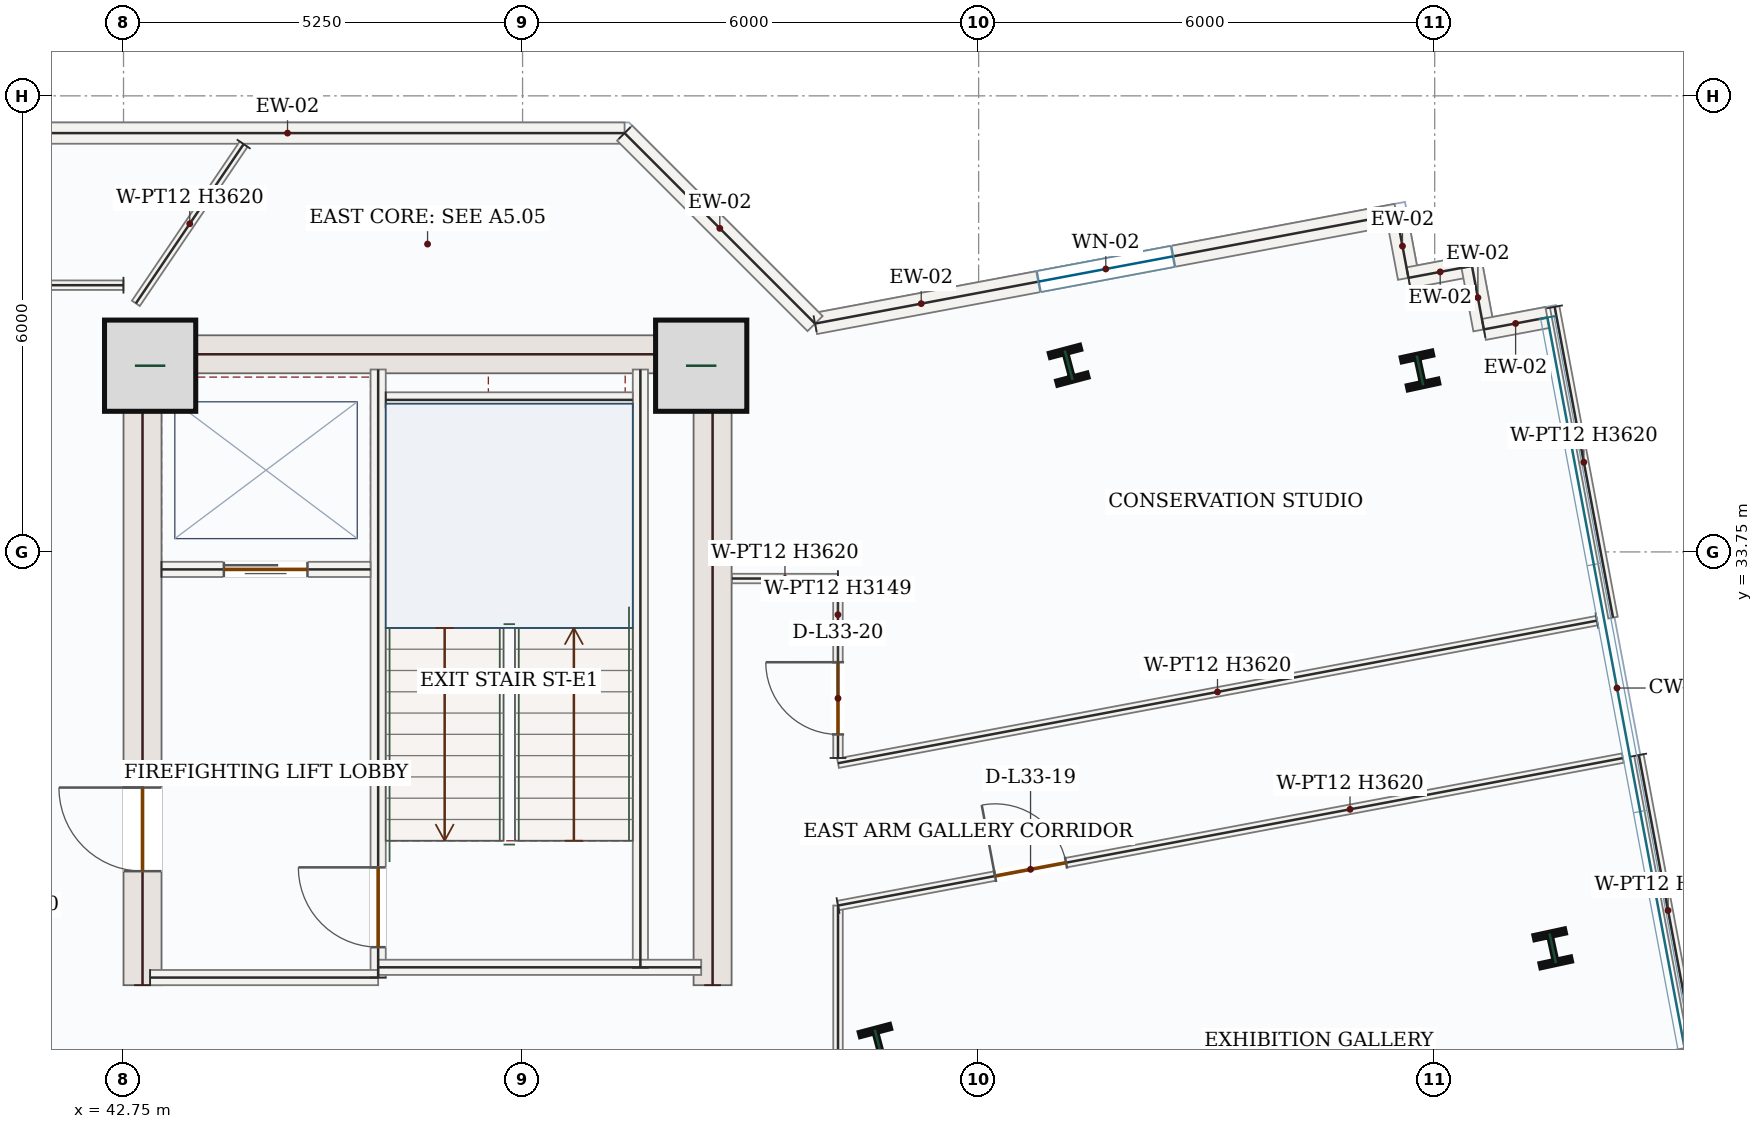
"""IFC4 building model, lengths in metres.
Left out: names, types, materials, properties, quantities, classifications, styles, units other than length and angle.
Written with IfcOpenShell. Run it as: python <this file> out.ifc"""

import sys

from ifc_helpers import new_model, si_unit, direction, frame, frame_2d, origin, origin_2d, place, context, subcontext, project, spatial, rectangle, i_section, extrude, source, transform, mapped, element, fill, save


model = new_model("IFC4")
c1 = context("Model", 3, precision=1e-05, world=origin(), true_north=direction((0.0, 1.0)))
c2 = subcontext(c1, "Body", "Model", "MODEL_VIEW")
j1 = project(units=[si_unit("LENGTHUNIT", "METRE"), si_unit("PLANEANGLEUNIT", "RADIAN")], contexts=[c1])
p1 = place(None, origin())
s1 = spatial("IfcSite", under=j1, at=p1, CompositionType="ELEMENT")
p2 = place(p1, origin())
s2 = spatial("IfcBuilding", under=s1, at=p2, CompositionType="ELEMENT")
p3 = place(p2, frame((0.0, 0.0, 147.3)))
s3 = spatial("IfcBuildingStorey", under=s2, at=p3, CompositionType="ELEMENT", Elevation=147.3)
p4 = place(p3, frame((43.0, 28.05, 0.0), z_axis=(0.0, 0.0, 1.0), x_axis=(0.0, 1.0, 0.0)))
e1 = element("IfcWall", 1, at=p4, inside=s3, PredefinedType="SHEAR", context=c2, shape_type="SweptSolid", body=[
    extrude(rectangle(XDim=8.55, YDim=0.5, at=frame_2d((4.275, 0.0))), origin(), (0.0, 0.0, 1.0), 3.62),
])
p5 = place(p4, frame((1.5, 0.0, 0.0)))
e2 = element("IfcOpeningElement", 2, at=p5, cuts=e1, PredefinedType="OPENING", context=c2, shape_type="SweptSolid", body=[
    extrude(rectangle(XDim=1.1, YDim=2.2, at=frame_2d((0.55, 1.1))), frame((0.0, 0.26, 0.0), z_axis=(0.0, -1.0, 0.0), x_axis=(1.0, 0.0, 0.0)), (0.0, 0.0, 1.0), 0.52),
])
m1 = source(origin(), c2, "Body", "SweptSolid", [
    extrude(rectangle(XDim=8.55, YDim=0.5, at=frame_2d((4.275, 0.0))), origin(), (0.0, 0.0, 1.0), 3.62),
])
p6 = place(p3, frame((50.5, 28.05, 0.0), z_axis=(0.0, 0.0, 1.0), x_axis=(0.0, 1.0, 0.0)))
e3 = element("IfcWall", 3, at=p6, inside=s3, PredefinedType="SHEAR", context=c2, shape_type="MappedRepresentation", body=[
    mapped(m1, transform((0.0, 0.0, 0.0), x_axis=(1.0, 0.0, 0.0), y_axis=(0.0, 1.0, 0.0), z_axis=(0.0, 0.0, 1.0), scale=1.0)),
])
m2 = source(origin(), c2, "Body", "SweptSolid", [
    extrude(rectangle(XDim=7.0, YDim=0.5, at=frame_2d((3.5, 0.0))), origin(), (0.0, 0.0, 1.0), 3.62),
])
p7 = place(p3, frame((43.25, 36.35, 0.0), z_axis=(0.0, 0.0, 1.0), x_axis=(1.0, 0.0, 0.0)))
e4 = element("IfcWall", 4, at=p7, inside=s3, PredefinedType="SHEAR", context=c2, shape_type="MappedRepresentation", body=[
    mapped(m2, transform((0.0, 0.0, 0.0), x_axis=(1.0, 0.0, 0.0), y_axis=(0.0, 1.0, 0.0), z_axis=(0.0, 0.0, 1.0), scale=1.0)),
])
m3 = source(origin(), c2, "Body", "SweptSolid", [
    extrude(rectangle(XDim=1.2, YDim=1.2, at=origin_2d()), origin(), (0.0, 0.0, 1.0), 3.9),
])
for number, where, z_axis, x_axis in (
    (5, (43.1, 36.2, 0.0), (0.0, 0.0, 1.0), (1.0, 0.0, 0.0)),
    (6, (50.35, 36.2, 0.0), (0.0, 0.0, 1.0), (1.0, 0.0, 0.0)),
):
    element("IfcColumn", number, at=place(p3, frame(where, z_axis=z_axis, x_axis=x_axis)), inside=s3, PredefinedType="COLUMN", context=c2, shape_type="MappedRepresentation", body=[
        mapped(m3, transform((0.0, 0.0, 0.0), x_axis=(1.0, 0.0, 0.0), y_axis=(0.0, 1.0, 0.0), z_axis=(0.0, 0.0, 1.0), scale=1.0)),
    ])
m4 = source(origin(), c2, "Body", "SweptSolid", [
    extrude(i_section(OverallWidth=0.412, OverallDepth=0.435, WebThickness=0.036, FlangeThickness=0.057, FilletRadius=0.018, at=origin_2d()), origin(), (0.0, 0.0, 1.0), 3.9),
])
for number, where, z_axis, x_axis in (
    (7, (52.684, 27.271, 0.0), (0.0, 0.0, 1.0), (0.967, 0.255, 0.0)),
    (8, (55.185, 36.206, 0.0), (0.0, 0.0, 1.0), (0.967, 0.255, 0.0)),
    (9, (61.553, 28.535, 0.0), (0.0, 0.0, 1.0), (0.977, 0.211, 0.0)),
    (10, (59.807, 36.137, 0.0), (0.0, 0.0, 1.0), (0.977, 0.211, 0.0)),
):
    element("IfcColumn", number, at=place(p3, frame(where, z_axis=z_axis, x_axis=x_axis)), inside=s3, PredefinedType="COLUMN", context=c2, shape_type="MappedRepresentation", body=[
        mapped(m4, transform((0.0, 0.0, 0.0), x_axis=(1.0, 0.0, 0.0), y_axis=(0.0, 1.0, 0.0), z_axis=(0.0, 0.0, 1.0), scale=1.0)),
    ])
p8 = place(p3, frame((51.848, 36.754, 0.0), z_axis=(0.0, 0.0, 1.0), x_axis=(0.982809278234, 0.18462373254, 0.0)))
e11 = element("IfcWall", 11, at=p8, inside=s3, PredefinedType="SOLIDWALL", context=c2, shape_type="SweptSolid", body=[
    extrude(rectangle(XDim=7.783, YDim=0.28, at=frame_2d((3.892, 0.0))), origin(), (0.0, 0.0, 1.0), 3.62),
])
p9 = place(p8, frame((2.992, 0.0, 0.85)))
e12 = element("IfcOpeningElement", 12, at=p9, cuts=e11, PredefinedType="OPENING", context=c2, shape_type="SweptSolid", body=[
    extrude(rectangle(XDim=1.8, YDim=1.75, at=frame_2d((0.9, 0.875))), frame((0.0, 0.15, 0.0), z_axis=(0.0, -1.0, 0.0), x_axis=(1.0, 0.0, 0.0)), (0.0, 0.0, 1.0), 0.3),
])
m5 = source(origin(), c2, "Body", "SweptSolid", [
    extrude(rectangle(XDim=0.85, YDim=0.28, at=frame_2d((0.425, 0.0))), origin(), (0.0, 0.0, 1.0), 3.62),
])
p10 = place(p3, frame((59.498, 38.191, 0.0), z_axis=(0.0, 0.0, 1.0), x_axis=(0.184670010318, -0.982800583684, 0.0)))
e13 = element("IfcWall", 13, at=p10, inside=s3, PredefinedType="SOLIDWALL", context=c2, shape_type="MappedRepresentation", body=[
    mapped(m5, transform((0.0, 0.0, 0.0), x_axis=(1.0, 0.0, 0.0), y_axis=(0.0, 1.0, 0.0), z_axis=(0.0, 0.0, 1.0), scale=1.0)),
])
m6 = source(origin(), c2, "Body", "SweptSolid", [
    extrude(rectangle(XDim=0.85, YDim=0.28, at=frame_2d((0.425, 0.0))), origin(), (0.0, 0.0, 1.0), 3.62),
])
for number, where, z_axis, x_axis in (
    (14, (59.655, 37.355, 0.0), (0.0, 0.0, 1.0), (0.983, 0.185, 0.0)),
    (15, (60.49, 37.512, 0.0), (0.0, 0.0, 1.0), (0.185, -0.983, 0.0)),
):
    element("IfcWall", number, at=place(p3, frame(where, z_axis=z_axis, x_axis=x_axis)), inside=s3, PredefinedType="SOLIDWALL", context=c2, shape_type="MappedRepresentation", body=[
        mapped(m6, transform((0.0, 0.0, 0.0), x_axis=(1.0, 0.0, 0.0), y_axis=(0.0, 1.0, 0.0), z_axis=(0.0, 0.0, 1.0), scale=1.0)),
    ])
for number, where, z_axis, x_axis in (
    (16, (60.647, 36.677, 0.0), (0.0, 0.0, 1.0), (0.983, 0.184, 0.0)),
    (17, (63.314, 27.085, 0.0), (0.0, 0.0, 1.0), (-0.983, -0.185, 0.0)),
):
    element("IfcWall", number, at=place(p3, frame(where, z_axis=z_axis, x_axis=x_axis)), inside=s3, PredefinedType="SOLIDWALL", context=c2, shape_type="MappedRepresentation", body=[
        mapped(m5, transform((0.0, 0.0, 0.0), x_axis=(1.0, 0.0, 0.0), y_axis=(0.0, 1.0, 0.0), z_axis=(0.0, 0.0, 1.0), scale=1.0)),
    ])
m7 = source(origin(), c2, "Body", "SweptSolid", [
    extrude(rectangle(XDim=8.869, YDim=0.28, at=frame_2d((4.434, 0.0))), origin(), (0.0, 0.0, 1.0), 3.62),
])
p11 = place(p3, frame((40.473, 39.26, 0.0), z_axis=(0.0, 0.0, 1.0), x_axis=(1.0, 0.0, 0.0)))
e18 = element("IfcWall", 18, at=p11, inside=s3, PredefinedType="SOLIDWALL", context=c2, shape_type="MappedRepresentation", body=[
    mapped(m7, transform((0.0, 0.0, 0.0), x_axis=(1.0, 0.0, 0.0), y_axis=(0.0, 1.0, 0.0), z_axis=(0.0, 0.0, 1.0), scale=1.0)),
])
m8 = source(origin(), c2, "Body", "SweptSolid", [
    extrude(rectangle(XDim=3.544, YDim=0.28, at=frame_2d((1.772, 0.0))), origin(), (0.0, 0.0, 1.0), 3.62),
])
p12 = place(p3, frame((49.342, 39.26, 0.0), z_axis=(0.0, 0.0, 1.0), x_axis=(0.707106781187, -0.707106781187, 0.0)))
e19 = element("IfcWall", 19, at=p12, inside=s3, PredefinedType="SOLIDWALL", context=c2, shape_type="MappedRepresentation", body=[
    mapped(m8, transform((0.0, 0.0, 0.0), x_axis=(1.0, 0.0, 0.0), y_axis=(0.0, 1.0, 0.0), z_axis=(0.0, 0.0, 1.0), scale=1.0)),
])
m9 = source(origin(), c2, "Body", "SweptSolid", [
    extrude(rectangle(XDim=7.87, YDim=0.2, at=frame_2d((3.935, 0.0))), origin(), (0.0, 0.0, 1.0), 3.62),
])
p13 = place(p3, frame((49.55, 28.28, 0.0), z_axis=(0.0, 0.0, 1.0), x_axis=(0.0, 1.0, 0.0)))
e20 = element("IfcWall", 20, at=p13, inside=s3, PredefinedType="SOLIDWALL", context=c2, shape_type="MappedRepresentation", body=[
    mapped(m9, transform((0.0, 0.0, 0.0), x_axis=(1.0, 0.0, 0.0), y_axis=(0.0, 1.0, 0.0), z_axis=(0.0, 0.0, 1.0), scale=1.0)),
])
p14 = place(p3, frame((46.1, 28.15, 0.0), z_axis=(0.0, 0.0, 1.0), x_axis=(0.0, 1.0, 0.0)))
e21 = element("IfcWall", 21, at=p14, inside=s3, PredefinedType="SOLIDWALL", context=c2, shape_type="SweptSolid", body=[
    extrude(rectangle(XDim=8.0, YDim=0.2, at=frame_2d((4.0, 0.0))), origin(), (0.0, 0.0, 1.0), 3.62),
])
p15 = place(p14, frame((0.4, 0.0, 0.0)))
e22 = element("IfcOpeningElement", 22, at=p15, cuts=e21, PredefinedType="OPENING", context=c2, shape_type="SweptSolid", body=[
    extrude(rectangle(XDim=1.05, YDim=2.15, at=frame_2d((0.525, 1.075))), frame((0.0, 0.11, 0.0), z_axis=(0.0, -1.0, 0.0), x_axis=(1.0, 0.0, 0.0)), (0.0, 0.0, 1.0), 0.22),
])
m10 = source(origin(), c2, "Body", "SweptSolid", [
    extrude(rectangle(XDim=3.0, YDim=0.2, at=frame_2d((1.5, 0.0))), origin(), (0.0, 0.0, 1.0), 3.62),
])
p16 = place(p3, frame((43.1, 28.15, 0.0), z_axis=(0.0, 0.0, 1.0), x_axis=(1.0, 0.0, 0.0)))
e23 = element("IfcWall", 23, at=p16, inside=s3, PredefinedType="SOLIDWALL", context=c2, shape_type="MappedRepresentation", body=[
    mapped(m10, transform((0.0, 0.0, 0.0), x_axis=(1.0, 0.0, 0.0), y_axis=(0.0, 1.0, 0.0), z_axis=(0.0, 0.0, 1.0), scale=1.0)),
])
m11 = source(origin(), c2, "Body", "SweptSolid", [
    extrude(rectangle(XDim=4.25, YDim=0.2, at=frame_2d((2.125, 0.0))), origin(), (0.0, 0.0, 1.0), 3.62),
])
p17 = place(p3, frame((46.1, 28.285, 0.0), z_axis=(0.0, 0.0, 1.0), x_axis=(1.0, 0.0, 0.0)))
e24 = element("IfcWall", 24, at=p17, inside=s3, PredefinedType="SOLIDWALL", context=c2, shape_type="MappedRepresentation", body=[
    mapped(m11, transform((0.0, 0.0, 0.0), x_axis=(1.0, 0.0, 0.0), y_axis=(0.0, 1.0, 0.0), z_axis=(0.0, 0.0, 1.0), scale=1.0)),
])
m12 = source(origin(), c2, "Body", "SweptSolid", [
    extrude(rectangle(XDim=3.25, YDim=0.2, at=frame_2d((1.625, 0.0))), origin(), (0.0, 0.0, 1.0), 3.62),
])
p18 = place(p3, frame((46.2, 35.75, 0.0), z_axis=(0.0, 0.0, 1.0), x_axis=(1.0, 0.0, 0.0)))
e25 = element("IfcWall", 25, at=p18, inside=s3, PredefinedType="SOLIDWALL", context=c2, shape_type="MappedRepresentation", body=[
    mapped(m12, transform((0.0, 0.0, 0.0), x_axis=(1.0, 0.0, 0.0), y_axis=(0.0, 1.0, 0.0), z_axis=(0.0, 0.0, 1.0), scale=1.0)),
])
p19 = place(p3, frame((43.25, 33.52, 0.0), z_axis=(0.0, 0.0, 1.0), x_axis=(1.0, 0.0, 0.0)))
e26 = element("IfcWall", 26, at=p19, inside=s3, PredefinedType="SOLIDWALL", context=c2, shape_type="SweptSolid", body=[
    extrude(rectangle(XDim=2.75, YDim=0.2, at=frame_2d((1.375, 0.0))), origin(), (0.0, 0.0, 1.0), 3.62),
])
p20 = place(p19, frame((0.82, 0.0, 0.0)))
e27 = element("IfcOpeningElement", 27, at=p20, cuts=e26, PredefinedType="OPENING", context=c2, shape_type="SweptSolid", body=[
    extrude(rectangle(XDim=1.1, YDim=2.15, at=frame_2d((0.55, 1.075))), frame((0.0, 0.11, 0.0), z_axis=(0.0, -1.0, 0.0), x_axis=(1.0, 0.0, 0.0)), (0.0, 0.0, 1.0), 0.22),
])
p21 = place(p3, frame((42.749, 37.259, 0.0), z_axis=(0.0, 0.0, 1.0), x_axis=(-0.999999992041, 0.000126163065, 0.0)))
e28 = element("IfcWall", 28, at=p21, inside=s3, PredefinedType="PARTITIONING", context=c2, shape_type="SweptSolid", body=[
    extrude(rectangle(XDim=7.74, YDim=0.125, at=frame_2d((3.87, 0.0))), origin(), (0.0, 0.0, 1.0), 3.62),
])
p22 = place(p21, frame((5.296, 0.0, 0.0)))
e29 = element("IfcOpeningElement", 29, at=p22, cuts=e28, PredefinedType="OPENING", context=c2, shape_type="SweptSolid", body=[
    extrude(rectangle(XDim=0.95, YDim=2.15, at=frame_2d((0.475, 1.075))), frame((0.0, 0.073, 0.0), z_axis=(0.0, -1.0, 0.0), x_axis=(1.0, 0.0, 0.0)), (0.0, 0.0, 1.0), 0.145),
])
m13 = source(origin(), c2, "Body", "SweptSolid", [
    extrude(rectangle(XDim=2.53, YDim=0.125, at=frame_2d((1.265, 0.0))), origin(), (0.0, 0.0, 1.0), 3.62),
])
p23 = place(p3, frame((44.33, 39.115, 0.0), z_axis=(0.0, 0.0, 1.0), x_axis=(-0.560455418396, -0.82818459536, 0.0)))
e30 = element("IfcWall", 30, at=p23, inside=s3, PredefinedType="PARTITIONING", context=c2, shape_type="MappedRepresentation", body=[
    mapped(m13, transform((0.0, 0.0, 0.0), x_axis=(1.0, 0.0, 0.0), y_axis=(0.0, 1.0, 0.0), z_axis=(0.0, 0.0, 1.0), scale=1.0)),
])
m14 = source(origin(), c2, "Body", "SweptSolid", [
    extrude(rectangle(XDim=4.16, YDim=0.125, at=frame_2d((2.08, 0.0))), origin(), (0.0, 0.0, 1.0), 3.62),
])
p24 = place(p3, frame((62.686, 31.077, 0.0), z_axis=(0.0, 0.0, 1.0), x_axis=(0.184635785614, -0.982807013951, 0.0)))
e31 = element("IfcWall", 31, at=p24, inside=s3, PredefinedType="PARTITIONING", context=c2, shape_type="MappedRepresentation", body=[
    mapped(m14, transform((0.0, 0.0, 0.0), x_axis=(1.0, 0.0, 0.0), y_axis=(0.0, 1.0, 0.0), z_axis=(0.0, 0.0, 1.0), scale=1.0)),
])
m15 = source(origin(), c2, "Body", "SweptSolid", [
    extrude(rectangle(XDim=5.975, YDim=0.125, at=frame_2d((2.988, 0.0))), origin(), (0.0, 0.0, 1.0), 2.766),
])
p25 = place(p3, frame((52.15, 23.123, 0.0), z_axis=(0.0, 0.0, 1.0), x_axis=(0.0, 1.0, 0.0)))
e32 = element("IfcWall", 32, at=p25, inside=s3, PredefinedType="PARTITIONING", context=c2, shape_type="MappedRepresentation", body=[
    mapped(m15, transform((0.0, 0.0, 0.0), x_axis=(1.0, 0.0, 0.0), y_axis=(0.0, 1.0, 0.0), z_axis=(0.0, 0.0, 1.0), scale=1.0)),
])
p26 = place(p3, frame((52.15, 29.098, 0.0), z_axis=(0.0, 0.0, 1.0), x_axis=(0.982805559331, 0.184643528314, 0.0)))
e33 = element("IfcWall", 33, at=p26, inside=s3, PredefinedType="PARTITIONING", context=c2, shape_type="SweptSolid", body=[
    extrude(rectangle(XDim=10.505, YDim=0.125, at=frame_2d((5.252, 0.0))), origin(), (0.0, 0.0, 1.0), 3.62),
])
p27 = place(p26, frame((2.102, 0.0, 0.0)))
e34 = element("IfcOpeningElement", 34, at=p27, cuts=e33, PredefinedType="OPENING", context=c2, shape_type="SweptSolid", body=[
    extrude(rectangle(XDim=0.95, YDim=2.15, at=frame_2d((0.475, 1.075))), frame((0.0, 0.073, 0.0), z_axis=(0.0, -1.0, 0.0), x_axis=(1.0, 0.0, 0.0)), (0.0, 0.0, 1.0), 0.145),
])
p28 = place(p3, frame((61.578, 36.974, 0.0), z_axis=(0.0, 0.0, 1.0), x_axis=(0.184635785614, -0.982807013951, 0.0)))
e35 = element("IfcWall", 35, at=p28, inside=s3, PredefinedType="PARTITIONING", context=c2, shape_type="MappedRepresentation", body=[
    mapped(m14, transform((0.0, 0.0, 0.0), x_axis=(1.0, 0.0, 0.0), y_axis=(0.0, 1.0, 0.0), z_axis=(0.0, 0.0, 1.0), scale=1.0)),
])
m16 = source(origin(), c2, "Body", "SweptSolid", [
    extrude(rectangle(XDim=10.16, YDim=0.125, at=frame_2d((5.08, 0.0))), origin(), (0.0, 0.0, 1.0), 3.62),
])
p29 = place(p3, frame((62.135, 32.846, 0.0), z_axis=(0.0, 0.0, 1.0), x_axis=(-0.982809288671, -0.184623676981, 0.0)))
e36 = element("IfcWall", 36, at=p29, inside=s3, PredefinedType="PARTITIONING", context=c2, shape_type="MappedRepresentation", body=[
    mapped(m16, transform((0.0, 0.0, 0.0), x_axis=(1.0, 0.0, 0.0), y_axis=(0.0, 1.0, 0.0), z_axis=(0.0, 0.0, 1.0), scale=1.0)),
])
p30 = place(p3, frame((52.15, 31.039, 0.0), z_axis=(0.0, 0.0, 1.0), x_axis=(-0.0004137788, 0.999999914394, 0.0)))
e37 = element("IfcWall", 37, at=p30, inside=s3, PredefinedType="PARTITIONING", context=c2, shape_type="SweptSolid", body=[
    extrude(rectangle(XDim=2.36, YDim=0.125, at=frame_2d((1.18, 0.0))), origin(), (0.0, 0.0, 1.0), 3.149),
])
p31 = place(p30, frame((0.31, 0.0, 0.0)))
e38 = element("IfcOpeningElement", 38, at=p31, cuts=e37, PredefinedType="OPENING", context=c2, shape_type="SweptSolid", body=[
    extrude(rectangle(XDim=0.95, YDim=2.15, at=frame_2d((0.475, 1.075))), frame((0.0, 0.073, 0.0), z_axis=(0.0, -1.0, 0.0), x_axis=(1.0, 0.0, 0.0)), (0.0, 0.0, 1.0), 0.145),
])
m17 = source(origin(), c2, "Body", "SweptSolid", [
    extrude(rectangle(XDim=1.394, YDim=0.125, at=frame_2d((0.697, 0.0))), origin(), (0.0, 0.0, 1.0), 3.62),
])
p32 = place(p3, frame((52.149, 33.399, 0.0), z_axis=(0.0, 0.0, 1.0), x_axis=(-0.999999754632, 0.000700525222, 0.0)))
e39 = element("IfcWall", 39, at=p32, inside=s3, PredefinedType="PARTITIONING", context=c2, shape_type="MappedRepresentation", body=[
    mapped(m17, transform((0.0, 0.0, 0.0), x_axis=(1.0, 0.0, 0.0), y_axis=(0.0, 1.0, 0.0), z_axis=(0.0, 0.0, 1.0), scale=1.0)),
])
m18 = source(origin(), c2, "Body", "SweptSolid", [
    extrude(rectangle(XDim=1.8, YDim=1.75, at=frame_2d((0.9, 0.875))), frame((0.0, 0.03, 0.0), z_axis=(0.0, -1.0, 0.0), x_axis=(1.0, 0.0, 0.0)), (0.0, 0.0, 1.0), 0.06),
])
p33 = place(p9, origin())
e40 = element("IfcWindow", 40, at=p33, inside=s3, PartitioningType="DOUBLE_PANEL_VERTICAL", PredefinedType="WINDOW", context=c2, shape_type="MappedRepresentation", body=[
    mapped(m18, transform((0.0, 0.0, 0.0), x_axis=(1.0, 0.0, 0.0), y_axis=(0.0, 1.0, 0.0), z_axis=(0.0, 0.0, 1.0), scale=1.0)),
])
fill(e12, e40)
m19 = source(origin(), c2, "Body", "SweptSolid", [
    extrude(rectangle(XDim=1.05, YDim=2.15, at=frame_2d((0.525, 1.075))), frame((0.0, 0.025, 0.0), z_axis=(0.0, -1.0, 0.0), x_axis=(1.0, 0.0, 0.0)), (0.0, 0.0, 1.0), 0.05),
])
p34 = place(p15, origin())
e41 = element("IfcDoor", 41, at=p34, inside=s3, OperationType="SINGLE_SWING_RIGHT", PredefinedType="DOOR", context=c2, shape_type="MappedRepresentation", body=[
    mapped(m19, transform((0.0, 0.0, 0.0), x_axis=(1.0, 0.0, 0.0), y_axis=(0.0, 1.0, 0.0), z_axis=(0.0, 0.0, 1.0), scale=1.0)),
])
fill(e22, e41)
m20 = source(origin(), c2, "Body", "SweptSolid", [
    extrude(rectangle(XDim=1.1, YDim=2.15, at=frame_2d((0.55, 1.075))), frame((0.0, 0.025, 0.0), z_axis=(0.0, -1.0, 0.0), x_axis=(1.0, 0.0, 0.0)), (0.0, 0.0, 1.0), 0.05),
])
p35 = place(p20, origin())
e42 = element("IfcDoor", 42, at=p35, inside=s3, OperationType="DOUBLE_DOOR_SLIDING", PredefinedType="DOOR", context=c2, shape_type="MappedRepresentation", body=[
    mapped(m20, transform((0.0, 0.0, 0.0), x_axis=(1.0, 0.0, 0.0), y_axis=(0.0, 1.0, 0.0), z_axis=(0.0, 0.0, 1.0), scale=1.0)),
])
fill(e27, e42)
m21 = source(origin(), c2, "Body", "SweptSolid", [
    extrude(rectangle(XDim=1.1, YDim=2.2, at=frame_2d((0.55, 1.1))), frame((0.0, 0.025, 0.0), z_axis=(0.0, -1.0, 0.0), x_axis=(1.0, 0.0, 0.0)), (0.0, 0.0, 1.0), 0.05),
])
p36 = place(p5, origin())
e43 = element("IfcDoor", 43, at=p36, inside=s3, OperationType="SINGLE_SWING_RIGHT", PredefinedType="DOOR", context=c2, shape_type="MappedRepresentation", body=[
    mapped(m21, transform((0.0, 0.0, 0.0), x_axis=(1.0, 0.0, 0.0), y_axis=(0.0, 1.0, 0.0), z_axis=(0.0, 0.0, 1.0), scale=1.0)),
])
fill(e2, e43)
m22 = source(origin(), c2, "Body", "SweptSolid", [
    extrude(rectangle(XDim=0.95, YDim=2.15, at=frame_2d((0.475, 1.075))), frame((0.0, 0.025, 0.0), z_axis=(0.0, -1.0, 0.0), x_axis=(1.0, 0.0, 0.0)), (0.0, 0.0, 1.0), 0.05),
])
p37 = place(p27, origin())
e44 = element("IfcDoor", 44, at=p37, inside=s3, OperationType="SINGLE_SWING_LEFT", PredefinedType="DOOR", context=c2, shape_type="MappedRepresentation", body=[
    mapped(m22, transform((0.0, 0.0, 0.0), x_axis=(1.0, 0.0, 0.0), y_axis=(0.0, 1.0, 0.0), z_axis=(0.0, 0.0, 1.0), scale=1.0)),
])
fill(e34, e44)
p38 = place(p31, origin())
e45 = element("IfcDoor", 45, at=p38, inside=s3, OperationType="SINGLE_SWING_RIGHT", PredefinedType="DOOR", context=c2, shape_type="MappedRepresentation", body=[
    mapped(m22, transform((0.0, 0.0, 0.0), x_axis=(1.0, 0.0, 0.0), y_axis=(0.0, 1.0, 0.0), z_axis=(0.0, 0.0, 1.0), scale=1.0)),
])
fill(e38, e45)
save(model, sys.argv[1])
